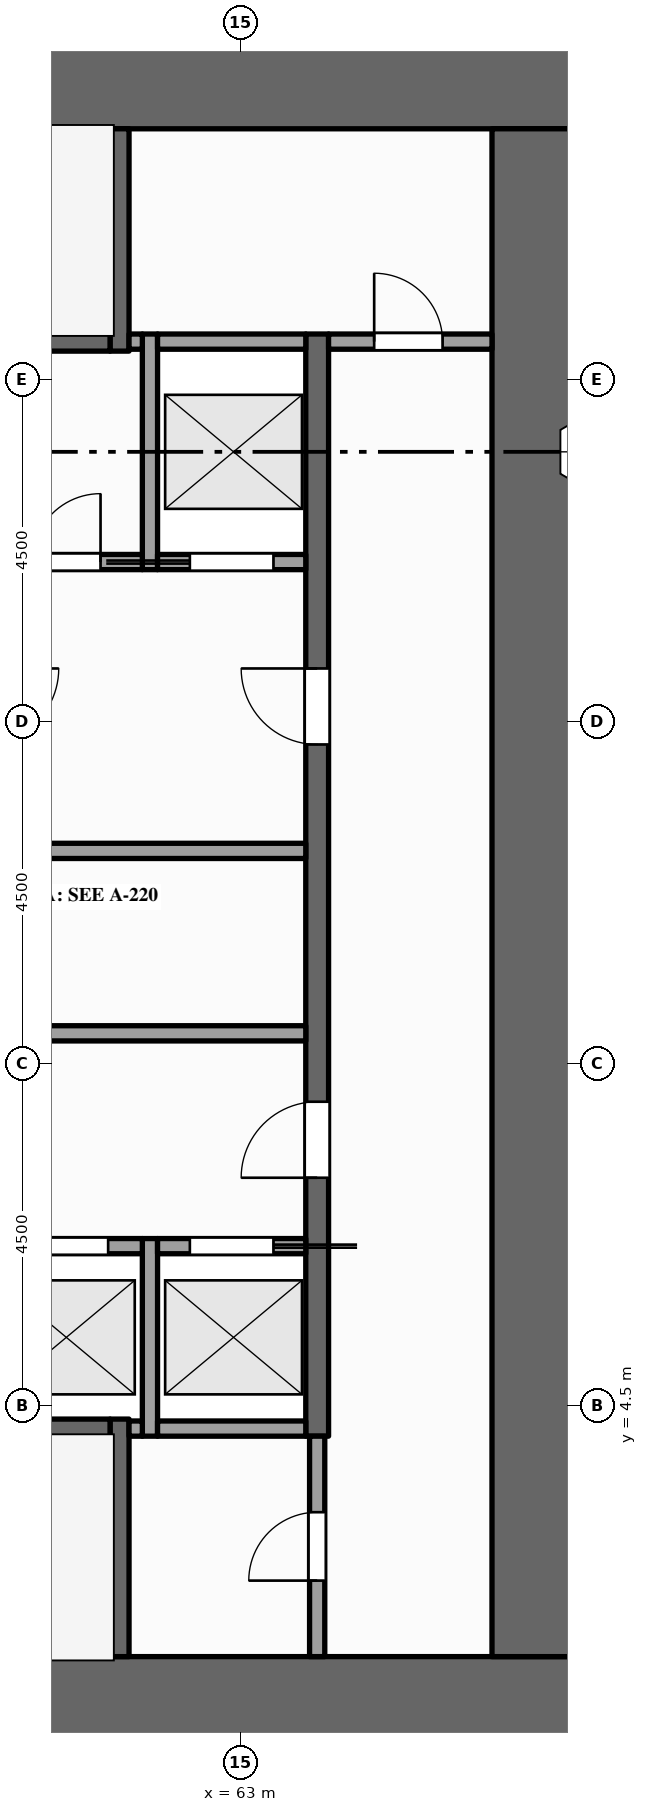
"""IFC4 building model, lengths in metres.
Left out: names, types, materials, properties, quantities, classifications, styles, units other than length and angle.
Written with IfcOpenShell. Run it as: python <this file> out.ifc"""

import sys

from ifc_helpers import new_model, si_unit, direction, frame, frame_2d, origin, place, context, subcontext, project, spatial, rectangle, extrude, element, fill, save


model = new_model("IFC4")
c1 = context("Model", 3, precision=1e-05, world=origin(), true_north=direction((0.0, 1.0)))
c2 = subcontext(c1, "Body", "Model", "MODEL_VIEW")
j1 = project(units=[si_unit("LENGTHUNIT", "METRE"), si_unit("PLANEANGLEUNIT", "RADIAN")], contexts=[c1])
p1 = place(None, origin())
s1 = spatial("IfcSite", under=j1, at=p1, CompositionType="ELEMENT")
p2 = place(p1, origin())
s2 = spatial("IfcBuilding", under=s1, at=p2, CompositionType="ELEMENT")
p3 = place(p2, frame((0.0, 0.0, 115.0)))
s3 = spatial("IfcBuildingStorey", under=s2, at=p3, CompositionType="ELEMENT", Elevation=115.0)
for number, where, z_axis, x_axis in (
    (1, (67.5, 0.6, -0.15), (0.0, 0.0, 1.0), (-1.0, 0.0, 0.0)),
    (2, (54.0, 21.9, -0.15), (0.0, 0.0, 1.0), (1.0, 0.0, 0.0)),
):
    element("IfcWall", number, at=place(p3, frame(where, z_axis=z_axis, x_axis=x_axis)), inside=s3, PredefinedType="SHEAR", context=c2, shape_type="SweptSolid", body=[
        extrude(rectangle(XDim=13.5, YDim=1.2, at=frame_2d((6.75, 0.0))), origin(), (0.0, 0.0, 1.0), 4.0),
    ])
p4 = place(p3, frame((66.9, 1.2, -0.15), z_axis=(0.0, 0.0, 1.0), x_axis=(0.0, 1.0, 0.0)))
e3 = element("IfcWall", 3, at=p4, inside=s3, PredefinedType="SHEAR", context=c2, shape_type="SweptSolid", body=[
    extrude(rectangle(XDim=20.1, YDim=1.2, at=frame_2d((10.05, 0.0))), origin(), (0.0, 0.0, 1.0), 4.0),
])
p5 = place(p3, frame((61.4, 1.2, 0.0), z_axis=(0.0, 0.0, 1.0), x_axis=(0.0, 1.0, 0.0)))
e4 = element("IfcWall", 4, at=p5, inside=s3, PredefinedType="SHEAR", context=c2, shape_type="SweptSolid", body=[
    extrude(rectangle(XDim=3.125, YDim=0.25, at=frame_2d((1.562, 0.0))), origin(), (0.0, 0.0, 1.0), 3.85),
])
p6 = place(p3, frame((61.4, 18.375, 0.0), z_axis=(0.0, 0.0, 1.0), x_axis=(0.0, 1.0, 0.0)))
e5 = element("IfcWall", 5, at=p6, inside=s3, PredefinedType="SHEAR", context=c2, shape_type="SweptSolid", body=[
    extrude(rectangle(XDim=2.925, YDim=0.25, at=frame_2d((1.462, 0.0))), origin(), (0.0, 0.0, 1.0), 3.85),
])
p7 = place(p3, frame((61.8, 4.1, 0.0), z_axis=(0.0, 0.0, 1.0), x_axis=(0.0, 1.0, 0.0)))
e6 = element("IfcWall", 6, at=p7, inside=s3, PredefinedType="SOLIDWALL", context=c2, shape_type="SweptSolid", body=[
    extrude(rectangle(XDim=2.6, YDim=0.2, at=frame_2d((1.3, 0.0))), origin(), (0.0, 0.0, 1.0), 3.85),
])
p8 = place(p3, frame((61.8, 15.5, 0.0), z_axis=(0.0, 0.0, 1.0), x_axis=(0.0, 1.0, 0.0)))
e7 = element("IfcWall", 7, at=p8, inside=s3, PredefinedType="SOLIDWALL", context=c2, shape_type="SweptSolid", body=[
    extrude(rectangle(XDim=3.1, YDim=0.2, at=frame_2d((1.55, 0.0))), origin(), (0.0, 0.0, 1.0), 3.85),
])
p9 = place(p3, frame((64.0, 1.2, 0.0), z_axis=(0.0, 0.0, 1.0), x_axis=(0.0, 1.0, 0.0)))
e8 = element("IfcWall", 8, at=p9, inside=s3, PredefinedType="PARTITIONING", context=c2, shape_type="SweptSolid", body=[
    extrude(rectangle(XDim=2.9, YDim=0.2, at=frame_2d((1.45, 0.0))), origin(), (0.0, 0.0, 1.0), 3.85),
])
p10 = place(p9, frame((1.0, 0.0, 0.0)))
e9 = element("IfcOpeningElement", 9, at=p10, cuts=e8, PredefinedType="OPENING", context=c2, shape_type="SweptSolid", body=[
    extrude(rectangle(XDim=0.9, YDim=2.1, at=frame_2d((0.45, 1.05))), frame((0.0, 0.11, 0.0), z_axis=(0.0, -1.0, 0.0), x_axis=(1.0, 0.0, 0.0)), (0.0, 0.0, 1.0), 0.22),
])
p11 = place(p3, frame((64.0, 4.1, 0.0), z_axis=(0.0, 0.0, 1.0), x_axis=(0.0, 1.0, 0.0)))
e10 = element("IfcWall", 10, at=p11, inside=s3, PredefinedType="SHEAR", context=c2, shape_type="SweptSolid", body=[
    extrude(rectangle(XDim=14.5, YDim=0.3, at=frame_2d((7.25, 0.0))), origin(), (0.0, 0.0, 1.0), 3.85),
])
p12 = place(p11, frame((3.4, 0.0, 0.0)))
e11 = element("IfcOpeningElement", 11, at=p12, cuts=e10, PredefinedType="OPENING", context=c2, shape_type="SweptSolid", body=[
    extrude(rectangle(XDim=1.0, YDim=2.1, at=frame_2d((0.5, 1.05))), frame((0.0, 0.16, 0.0), z_axis=(0.0, -1.0, 0.0), x_axis=(1.0, 0.0, 0.0)), (0.0, 0.0, 1.0), 0.32),
])
p13 = place(p11, frame((9.1, 0.0, 0.0)))
e12 = element("IfcOpeningElement", 12, at=p13, cuts=e10, PredefinedType="OPENING", context=c2, shape_type="SweptSolid", body=[
    extrude(rectangle(XDim=1.0, YDim=2.1, at=frame_2d((0.5, 1.05))), frame((0.0, 0.16, 0.0), z_axis=(0.0, -1.0, 0.0), x_axis=(1.0, 0.0, 0.0)), (0.0, 0.0, 1.0), 0.32),
])
p14 = place(p3, frame((55.2, 4.2, 0.0), z_axis=(0.0, 0.0, 1.0), x_axis=(1.0, 0.0, 0.0)))
e13 = element("IfcWall", 13, at=p14, inside=s3, PredefinedType="SHEAR", context=c2, shape_type="SweptSolid", body=[
    extrude(rectangle(XDim=6.075, YDim=0.25, at=frame_2d((3.038, 0.0))), origin(), (0.0, 0.0, 1.0), 3.85),
])
p15 = place(p3, frame((61.525, 4.2, 0.0), z_axis=(0.0, 0.0, 1.0), x_axis=(1.0, 0.0, 0.0)))
e14 = element("IfcWall", 14, at=p15, inside=s3, PredefinedType="SOLIDWALL", context=c2, shape_type="SweptSolid", body=[
    extrude(rectangle(XDim=0.175, YDim=0.2, at=frame_2d((0.087, 0.0))), origin(), (0.0, 0.0, 1.0), 3.85),
])
p16 = place(p3, frame((61.9, 4.2, 0.0), z_axis=(0.0, 0.0, 1.0), x_axis=(1.0, 0.0, 0.0)))
e15 = element("IfcWall", 15, at=p16, inside=s3, PredefinedType="SOLIDWALL", context=c2, shape_type="SweptSolid", body=[
    extrude(rectangle(XDim=1.95, YDim=0.2, at=frame_2d((0.975, 0.0))), origin(), (0.0, 0.0, 1.0), 3.85),
])
p17 = place(p3, frame((59.7, 6.6, 0.0), z_axis=(0.0, 0.0, 1.0), x_axis=(1.0, 0.0, 0.0)))
e16 = element("IfcWall", 16, at=p17, inside=s3, PredefinedType="SOLIDWALL", context=c2, shape_type="SweptSolid", body=[
    extrude(rectangle(XDim=2.0, YDim=0.2, at=frame_2d((1.0, 0.0))), origin(), (0.0, 0.0, 1.0), 3.85),
])
p18 = place(p17, frame((0.45, 0.0, 0.012)))
e17 = element("IfcOpeningElement", 17, at=p18, cuts=e16, PredefinedType="OPENING", context=c2, shape_type="SweptSolid", body=[
    extrude(rectangle(XDim=1.1, YDim=2.1, at=frame_2d((0.55, 1.05))), frame((0.0, 0.11, 0.0), z_axis=(0.0, -1.0, 0.0), x_axis=(1.0, 0.0, 0.0)), (0.0, 0.0, 1.0), 0.22),
])
p19 = place(p3, frame((61.9, 6.6, 0.0), z_axis=(0.0, 0.0, 1.0), x_axis=(1.0, 0.0, 0.0)))
e18 = element("IfcWall", 18, at=p19, inside=s3, PredefinedType="SOLIDWALL", context=c2, shape_type="SweptSolid", body=[
    extrude(rectangle(XDim=1.95, YDim=0.2, at=frame_2d((0.975, 0.0))), origin(), (0.0, 0.0, 1.0), 3.85),
])
p20 = place(p19, frame((0.425, 0.0, 0.012)))
e19 = element("IfcOpeningElement", 19, at=p20, cuts=e18, PredefinedType="OPENING", context=c2, shape_type="SweptSolid", body=[
    extrude(rectangle(XDim=1.1, YDim=2.1, at=frame_2d((0.55, 1.05))), frame((0.0, 0.11, 0.0), z_axis=(0.0, -1.0, 0.0), x_axis=(1.0, 0.0, 0.0)), (0.0, 0.0, 1.0), 0.22),
])
p21 = place(p3, frame((55.2, 9.4, 0.0), z_axis=(0.0, 0.0, 1.0), x_axis=(1.0, 0.0, 0.0)))
e20 = element("IfcWall", 20, at=p21, inside=s3, PredefinedType="PARTITIONING", context=c2, shape_type="SweptSolid", body=[
    extrude(rectangle(XDim=8.65, YDim=0.2, at=frame_2d((4.325, 0.0))), origin(), (0.0, 0.0, 1.0), 3.85),
])
p22 = place(p21, frame((3.875, 0.0, 0.0)))
e21 = element("IfcOpeningElement", 21, at=p22, cuts=e20, PredefinedType="OPENING", context=c2, shape_type="SweptSolid", body=[
    extrude(rectangle(XDim=0.9, YDim=2.1, at=frame_2d((0.45, 1.05))), frame((0.0, 0.11, 0.0), z_axis=(0.0, -1.0, 0.0), x_axis=(1.0, 0.0, 0.0)), (0.0, 0.0, 1.0), 0.22),
])
p23 = place(p3, frame((59.7, 11.8, 0.0), z_axis=(0.0, 0.0, 1.0), x_axis=(1.0, 0.0, 0.0)))
e22 = element("IfcWall", 22, at=p23, inside=s3, PredefinedType="PARTITIONING", context=c2, shape_type="SweptSolid", body=[
    extrude(rectangle(XDim=4.15, YDim=0.2, at=frame_2d((2.075, 0.0))), origin(), (0.0, 0.0, 1.0), 3.85),
])
p24 = place(p3, frame((59.7, 15.6, 0.0), z_axis=(0.0, 0.0, 1.0), x_axis=(1.0, 0.0, 0.0)))
e23 = element("IfcWall", 23, at=p24, inside=s3, PredefinedType="PARTITIONING", context=c2, shape_type="SweptSolid", body=[
    extrude(rectangle(XDim=2.0, YDim=0.2, at=frame_2d((1.0, 0.0))), origin(), (0.0, 0.0, 1.0), 3.85),
])
p25 = place(p24, frame((0.55, 0.0, 0.0)))
e24 = element("IfcOpeningElement", 24, at=p25, cuts=e23, PredefinedType="OPENING", context=c2, shape_type="SweptSolid", body=[
    extrude(rectangle(XDim=0.9, YDim=2.1, at=frame_2d((0.45, 1.05))), frame((0.0, 0.11, 0.0), z_axis=(0.0, -1.0, 0.0), x_axis=(1.0, 0.0, 0.0)), (0.0, 0.0, 1.0), 0.22),
])
p26 = place(p3, frame((61.9, 15.6, 0.0), z_axis=(0.0, 0.0, 1.0), x_axis=(1.0, 0.0, 0.0)))
e25 = element("IfcWall", 25, at=p26, inside=s3, PredefinedType="SOLIDWALL", context=c2, shape_type="SweptSolid", body=[
    extrude(rectangle(XDim=1.95, YDim=0.2, at=frame_2d((0.975, 0.0))), origin(), (0.0, 0.0, 1.0), 3.85),
])
p27 = place(p26, frame((0.425, 0.0, 0.012)))
e26 = element("IfcOpeningElement", 26, at=p27, cuts=e25, PredefinedType="OPENING", context=c2, shape_type="SweptSolid", body=[
    extrude(rectangle(XDim=1.1, YDim=2.1, at=frame_2d((0.55, 1.05))), frame((0.0, 0.11, 0.0), z_axis=(0.0, -1.0, 0.0), x_axis=(1.0, 0.0, 0.0)), (0.0, 0.0, 1.0), 0.22),
])
p28 = place(p3, frame((55.2, 18.5, 0.0), z_axis=(0.0, 0.0, 1.0), x_axis=(1.0, 0.0, 0.0)))
e27 = element("IfcWall", 27, at=p28, inside=s3, PredefinedType="SHEAR", context=c2, shape_type="SweptSolid", body=[
    extrude(rectangle(XDim=6.075, YDim=0.25, at=frame_2d((3.038, 0.0))), origin(), (0.0, 0.0, 1.0), 3.85),
])
p29 = place(p3, frame((61.525, 18.5, 0.0), z_axis=(0.0, 0.0, 1.0), x_axis=(1.0, 0.0, 0.0)))
e28 = element("IfcWall", 28, at=p29, inside=s3, PredefinedType="PARTITIONING", context=c2, shape_type="SweptSolid", body=[
    extrude(rectangle(XDim=0.175, YDim=0.2, at=frame_2d((0.087, 0.0))), origin(), (0.0, 0.0, 1.0), 3.85),
])
p30 = place(p3, frame((61.9, 18.5, 0.0), z_axis=(0.0, 0.0, 1.0), x_axis=(1.0, 0.0, 0.0)))
e29 = element("IfcWall", 29, at=p30, inside=s3, PredefinedType="SOLIDWALL", context=c2, shape_type="SweptSolid", body=[
    extrude(rectangle(XDim=1.95, YDim=0.2, at=frame_2d((0.975, 0.0))), origin(), (0.0, 0.0, 1.0), 3.85),
])
p31 = place(p3, frame((64.15, 18.5, 0.0), z_axis=(0.0, 0.0, 1.0), x_axis=(1.0, 0.0, 0.0)))
e30 = element("IfcWall", 30, at=p31, inside=s3, PredefinedType="PARTITIONING", context=c2, shape_type="SweptSolid", body=[
    extrude(rectangle(XDim=2.15, YDim=0.2, at=frame_2d((1.075, 0.0))), origin(), (0.0, 0.0, 1.0), 3.85),
])
p32 = place(p31, frame((0.6, 0.0, 0.0)))
e31 = element("IfcOpeningElement", 31, at=p32, cuts=e30, PredefinedType="OPENING", context=c2, shape_type="SweptSolid", body=[
    extrude(rectangle(XDim=0.9, YDim=2.1, at=frame_2d((0.45, 1.05))), frame((0.0, 0.11, 0.0), z_axis=(0.0, -1.0, 0.0), x_axis=(1.0, 0.0, 0.0)), (0.0, 0.0, 1.0), 0.22),
])
p33 = place(p18, origin())
e32 = element("IfcDoor", 32, at=p33, inside=s3, OperationType="SLIDING_TO_LEFT", PredefinedType="DOOR", context=c2, shape_type="SweptSolid", body=[
    extrude(rectangle(XDim=1.1, YDim=2.1, at=frame_2d((0.55, 1.05))), frame((0.0, 0.025, 0.0), z_axis=(0.0, -1.0, 0.0), x_axis=(1.0, 0.0, 0.0)), (0.0, 0.0, 1.0), 0.05),
])
fill(e17, e32)
p34 = place(p20, origin())
e33 = element("IfcDoor", 33, at=p34, inside=s3, OperationType="SLIDING_TO_RIGHT", PredefinedType="DOOR", context=c2, shape_type="SweptSolid", body=[
    extrude(rectangle(XDim=1.1, YDim=2.1, at=frame_2d((0.55, 1.05))), frame((0.0, 0.025, 0.0), z_axis=(0.0, -1.0, 0.0), x_axis=(1.0, 0.0, 0.0)), (0.0, 0.0, 1.0), 0.05),
])
fill(e19, e33)
p35 = place(p27, origin())
e34 = element("IfcDoor", 34, at=p35, inside=s3, OperationType="SLIDING_TO_LEFT", PredefinedType="DOOR", context=c2, shape_type="SweptSolid", body=[
    extrude(rectangle(XDim=1.1, YDim=2.1, at=frame_2d((0.55, 1.05))), frame((0.0, 0.025, 0.0), z_axis=(0.0, -1.0, 0.0), x_axis=(1.0, 0.0, 0.0)), (0.0, 0.0, 1.0), 0.05),
])
fill(e26, e34)
p36 = place(p12, origin())
e35 = element("IfcDoor", 35, at=p36, inside=s3, OperationType="SINGLE_SWING_LEFT", PredefinedType="DOOR", context=c2, shape_type="SweptSolid", body=[
    extrude(rectangle(XDim=1.0, YDim=2.1, at=frame_2d((0.5, 1.05))), frame((0.0, 0.025, 0.0), z_axis=(0.0, -1.0, 0.0), x_axis=(1.0, 0.0, 0.0)), (0.0, 0.0, 1.0), 0.05),
])
fill(e11, e35)
p37 = place(p13, origin())
e36 = element("IfcDoor", 36, at=p37, inside=s3, OperationType="SINGLE_SWING_RIGHT", PredefinedType="DOOR", context=c2, shape_type="SweptSolid", body=[
    extrude(rectangle(XDim=1.0, YDim=2.1, at=frame_2d((0.5, 1.05))), frame((0.0, 0.025, 0.0), z_axis=(0.0, -1.0, 0.0), x_axis=(1.0, 0.0, 0.0)), (0.0, 0.0, 1.0), 0.05),
])
fill(e12, e36)
p38 = place(p10, origin())
e37 = element("IfcDoor", 37, at=p38, inside=s3, OperationType="SINGLE_SWING_LEFT", PredefinedType="DOOR", context=c2, shape_type="SweptSolid", body=[
    extrude(rectangle(XDim=0.9, YDim=2.1, at=frame_2d((0.45, 1.05))), frame((0.0, 0.025, 0.0), z_axis=(0.0, -1.0, 0.0), x_axis=(1.0, 0.0, 0.0)), (0.0, 0.0, 1.0), 0.05),
])
fill(e9, e37)
p39 = place(p32, origin())
e38 = element("IfcDoor", 38, at=p39, inside=s3, OperationType="SINGLE_SWING_LEFT", PredefinedType="DOOR", context=c2, shape_type="SweptSolid", body=[
    extrude(rectangle(XDim=0.9, YDim=2.1, at=frame_2d((0.45, 1.05))), frame((0.0, 0.025, 0.0), z_axis=(0.0, -1.0, 0.0), x_axis=(1.0, 0.0, 0.0)), (0.0, 0.0, 1.0), 0.05),
])
fill(e31, e38)
p40 = place(p25, origin())
e39 = element("IfcDoor", 39, at=p40, inside=s3, OperationType="SINGLE_SWING_RIGHT", PredefinedType="DOOR", context=c2, shape_type="SweptSolid", body=[
    extrude(rectangle(XDim=0.9, YDim=2.1, at=frame_2d((0.45, 1.05))), frame((0.0, 0.025, 0.0), z_axis=(0.0, -1.0, 0.0), x_axis=(1.0, 0.0, 0.0)), (0.0, 0.0, 1.0), 0.05),
])
fill(e24, e39)
save(model, sys.argv[1])
